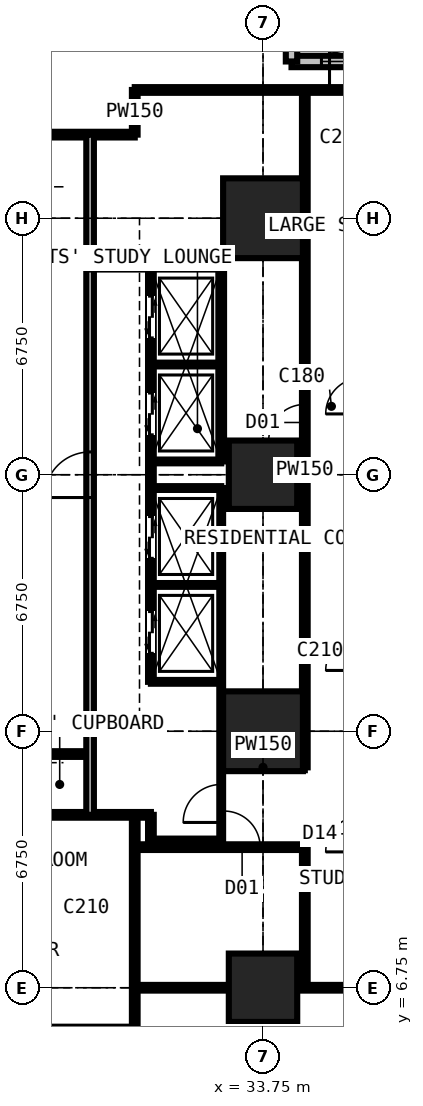
"""IFC4 building model, lengths in metres.
Left out: names, types, materials, properties, quantities, classifications, styles, units other than length and angle.
Written with IfcOpenShell. Run it as: python <this file> out.ifc"""

import sys

from ifc_helpers import new_model, si_unit, direction, frame, frame_2d, origin, origin_2d, place, context, subcontext, project, spatial, rectangle, extrude, element, fill, save


model = new_model("IFC4")
c1 = context("Model", 3, precision=1e-05, world=origin(), true_north=direction((0.0, 1.0)))
c2 = subcontext(c1, "Body", "Model", "MODEL_VIEW")
j1 = project(units=[si_unit("LENGTHUNIT", "METRE"), si_unit("PLANEANGLEUNIT", "RADIAN")], contexts=[c1])
p1 = place(None, origin())
s1 = spatial("IfcSite", under=j1, at=p1, CompositionType="ELEMENT")
p2 = place(p1, origin())
s2 = spatial("IfcBuilding", under=s1, at=p2, CompositionType="ELEMENT")
p3 = place(p2, frame((0.0, 0.0, 83.7)))
s3 = spatial("IfcBuildingStorey", under=s2, at=p3, CompositionType="ELEMENT", Elevation=83.7)
p4 = place(p3, frame((33.75, 6.75, 0.0), z_axis=(0.0, 0.0, 1.0), x_axis=(1.0, 0.0, 0.0)))
e1 = element("IfcColumn", 1, at=p4, inside=s3, PredefinedType="COLUMN", context=c2, shape_type="SweptSolid", body=[
    extrude(rectangle(XDim=1.8, YDim=1.8, at=origin_2d()), origin(), (0.0, 0.0, 1.0), 3.6),
])
p5 = place(p3, frame((33.75, 13.5, 0.0), z_axis=(0.0, 0.0, 1.0), x_axis=(1.0, 0.0, 0.0)))
e2 = element("IfcColumn", 2, at=p5, inside=s3, PredefinedType="COLUMN", context=c2, shape_type="SweptSolid", body=[
    extrude(rectangle(XDim=2.1, YDim=2.1, at=origin_2d()), origin(), (0.0, 0.0, 1.0), 3.6),
])
p6 = place(p3, frame((33.75, 20.25, 0.0), z_axis=(0.0, 0.0, 1.0), x_axis=(1.0, 0.0, 0.0)))
e3 = element("IfcColumn", 3, at=p6, inside=s3, PredefinedType="COLUMN", context=c2, shape_type="SweptSolid", body=[
    extrude(rectangle(XDim=1.8, YDim=1.8, at=origin_2d()), origin(), (0.0, 0.0, 1.0), 3.6),
])
p7 = place(p3, frame((33.75, 27.0, 0.0), z_axis=(0.0, 0.0, 1.0), x_axis=(1.0, 0.0, 0.0)))
e4 = element("IfcColumn", 4, at=p7, inside=s3, PredefinedType="COLUMN", context=c2, shape_type="SweptSolid", body=[
    extrude(rectangle(XDim=2.1, YDim=2.1, at=origin_2d()), origin(), (0.0, 0.0, 1.0), 3.6),
])
p8 = place(p3, frame((37.875, 31.125, 0.0), z_axis=(0.0, 0.0, 1.0), x_axis=(-1.0, 0.0, 0.0)))
e5 = element("IfcWall", 5, at=p8, inside=s3, PredefinedType="SOLIDWALL", context=c2, shape_type="SweptSolid", body=[
    extrude(rectangle(XDim=3.375, YDim=0.3, at=frame_2d((1.688, 0.0))), origin(), (0.0, 0.0, 1.0), 3.375),
])
p9 = place(p8, frame((0.788, 0.0, 0.6)))
e6 = element("IfcOpeningElement", 6, at=p9, cuts=e5, PredefinedType="OPENING", context=c2, shape_type="SweptSolid", body=[
    extrude(rectangle(XDim=1.8, YDim=2.1, at=frame_2d((0.9, 1.05))), frame((0.0, 0.16, 0.0), z_axis=(0.0, -1.0, 0.0), x_axis=(1.0, 0.0, 0.0)), (0.0, 0.0, 1.0), 0.32),
])
p10 = place(p3, frame((34.5, 31.125, 0.0), z_axis=(0.0, 0.0, 1.0), x_axis=(0.0, 1.0, 0.0)))
e7 = element("IfcWall", 7, at=p10, inside=s3, PredefinedType="SOLIDWALL", context=c2, shape_type="SweptSolid", body=[
    extrude(rectangle(XDim=3.375, YDim=0.3, at=frame_2d((1.688, 0.0))), origin(), (0.0, 0.0, 1.0), 3.375),
])
p11 = place(p10, frame((0.343, 0.0, 0.9)))
e8 = element("IfcOpeningElement", 8, at=p11, cuts=e7, PredefinedType="OPENING", context=c2, shape_type="SweptSolid", body=[
    extrude(rectangle(XDim=1.2, YDim=1.8, at=frame_2d((0.6, 0.9))), frame((0.0, 0.16, 0.0), z_axis=(0.0, -1.0, 0.0), x_axis=(1.0, 0.0, 0.0)), (0.0, 0.0, 1.0), 0.32),
])
p12 = place(p3, frame((10.125, 11.3, 0.0), z_axis=(0.0, 0.0, 1.0), x_axis=(1.0, 0.0, 0.0)))
e9 = element("IfcWall", 9, at=p12, inside=s3, PredefinedType="PARTITIONING", context=c2, shape_type="SweptSolid", body=[
    extrude(rectangle(XDim=20.675, YDim=0.15, at=frame_2d((10.337, 0.0))), origin(), (0.0, 0.0, 1.0), 3.375),
])
p13 = place(p12, frame((8.375, 0.0, 0.0)))
e10 = element("IfcOpeningElement", 10, at=p13, cuts=e9, PredefinedType="OPENING", context=c2, shape_type="SweptSolid", body=[
    extrude(rectangle(XDim=1.0, YDim=2.2, at=frame_2d((0.5, 1.1))), frame((0.0, 0.085, 0.0), z_axis=(0.0, -1.0, 0.0), x_axis=(1.0, 0.0, 0.0)), (0.0, 0.0, 1.0), 0.17),
])
p14 = place(p12, frame((10.975, 0.0, 0.0)))
e11 = element("IfcOpeningElement", 11, at=p14, cuts=e9, PredefinedType="OPENING", context=c2, shape_type="SweptSolid", body=[
    extrude(rectangle(XDim=1.0, YDim=2.2, at=frame_2d((0.5, 1.1))), frame((0.0, 0.085, 0.0), z_axis=(0.0, -1.0, 0.0), x_axis=(1.0, 0.0, 0.0)), (0.0, 0.0, 1.0), 0.17),
])
p15 = place(p12, frame((3.925, 0.0, 0.0)))
e12 = element("IfcOpeningElement", 12, at=p15, cuts=e9, PredefinedType="OPENING", context=c2, shape_type="SweptSolid", body=[
    extrude(rectangle(XDim=0.95, YDim=2.2, at=frame_2d((0.475, 1.1))), frame((0.0, 0.085, 0.0), z_axis=(0.0, -1.0, 0.0), x_axis=(1.0, 0.0, 0.0)), (0.0, 0.0, 1.0), 0.17),
])
p16 = place(p3, frame((11.3, 29.2, 0.0), z_axis=(0.0, 0.0, 1.0), x_axis=(1.0, 0.0, 0.0)))
e13 = element("IfcWall", 13, at=p16, inside=s3, PredefinedType="PARTITIONING", context=c2, shape_type="SweptSolid", body=[
    extrude(rectangle(XDim=19.075, YDim=0.15, at=frame_2d((9.538, 0.0))), origin(), (0.0, 0.0, 1.0), 3.375),
])
p17 = place(p16, frame((5.825, 0.0, 0.0)))
e14 = element("IfcOpeningElement", 14, at=p17, cuts=e13, PredefinedType="OPENING", context=c2, shape_type="SweptSolid", body=[
    extrude(rectangle(XDim=0.95, YDim=2.2, at=frame_2d((0.475, 1.1))), frame((0.0, 0.085, 0.0), z_axis=(0.0, -1.0, 0.0), x_axis=(1.0, 0.0, 0.0)), (0.0, 0.0, 1.0), 0.17),
])
p18 = place(p16, frame((9.2, 0.0, 0.0)))
e15 = element("IfcOpeningElement", 15, at=p18, cuts=e13, PredefinedType="OPENING", context=c2, shape_type="SweptSolid", body=[
    extrude(rectangle(XDim=0.95, YDim=2.2, at=frame_2d((0.475, 1.1))), frame((0.0, 0.085, 0.0), z_axis=(0.0, -1.0, 0.0), x_axis=(1.0, 0.0, 0.0)), (0.0, 0.0, 1.0), 0.17),
])
p19 = place(p16, frame((0.6, 0.0, 0.0)))
e16 = element("IfcOpeningElement", 16, at=p19, cuts=e13, PredefinedType="OPENING", context=c2, shape_type="SweptSolid", body=[
    extrude(rectangle(XDim=1.0, YDim=2.2, at=frame_2d((0.5, 1.1))), frame((0.0, 0.085, 0.0), z_axis=(0.0, -1.0, 0.0), x_axis=(1.0, 0.0, 0.0)), (0.0, 0.0, 1.0), 0.17),
])
p20 = place(p3, frame((27.6, 12.9, 0.0), z_axis=(0.0, 0.0, 1.0), x_axis=(1.0, 0.0, 0.0)))
e17 = element("IfcWall", 17, at=p20, inside=s3, PredefinedType="PARTITIONING", context=c2, shape_type="SweptSolid", body=[
    extrude(rectangle(XDim=1.6, YDim=0.15, at=frame_2d((0.8, 0.0))), origin(), (0.0, 0.0, 1.0), 2.806),
])
p21 = place(p3, frame((29.2, 11.3, 0.0), z_axis=(0.0, 0.0, 1.0), x_axis=(0.0, 1.0, 0.0)))
e18 = element("IfcWall", 18, at=p21, inside=s3, PredefinedType="PARTITIONING", context=c2, shape_type="SweptSolid", body=[
    extrude(rectangle(XDim=17.9, YDim=0.2, at=frame_2d((8.95, 0.0))), origin(), (0.0, 0.0, 1.0), 3.375),
])
p22 = place(p21, frame((8.35, 0.0, 0.0)))
e19 = element("IfcOpeningElement", 19, at=p22, cuts=e18, PredefinedType="OPENING", context=c2, shape_type="SweptSolid", body=[
    extrude(rectangle(XDim=1.2, YDim=2.2, at=frame_2d((0.6, 1.1))), frame((0.0, 0.11, 0.0), z_axis=(0.0, -1.0, 0.0), x_axis=(1.0, 0.0, 0.0)), (0.0, 0.0, 1.0), 0.22),
])
p23 = place(p3, frame((29.2, 25.7, 0.0), z_axis=(0.0, 0.0, 1.0), x_axis=(1.0, 0.0, 0.0)))
e20 = element("IfcWall", 20, at=p23, inside=s3, PredefinedType="SHEAR", context=c2, shape_type="SweptSolid", body=[
    extrude(rectangle(XDim=3.45, YDim=0.1, at=frame_2d((1.725, 0.0))), origin(), (0.0, 0.0, 1.0), 3.375),
])
p24 = place(p3, frame((30.375, -0.734, 0.0), z_axis=(0.0, 0.0, 1.0), x_axis=(0.0, 1.0, 0.0)))
e21 = element("IfcWall", 21, at=p24, inside=s3, PredefinedType="PARTITIONING", context=c2, shape_type="SweptSolid", body=[
    extrude(rectangle(XDim=12.034, YDim=0.15, at=frame_2d((6.017, 0.0))), origin(), (0.0, 0.0, 1.0), 3.375),
])
p25 = place(p24, frame((5.134, 0.0, 0.0)))
e22 = element("IfcOpeningElement", 22, at=p25, cuts=e21, PredefinedType="OPENING", context=c2, shape_type="SweptSolid", body=[
    extrude(rectangle(XDim=1.0, YDim=2.2, at=frame_2d((0.5, 1.1))), frame((0.0, 0.085, 0.0), z_axis=(0.0, -1.0, 0.0), x_axis=(1.0, 0.0, 0.0)), (0.0, 0.0, 1.0), 0.17),
])
p26 = place(p3, frame((30.375, 6.75, 0.0), z_axis=(0.0, 0.0, 1.0), x_axis=(1.0, 0.0, 0.0)))
e23 = element("IfcWall", 23, at=p26, inside=s3, PredefinedType="PARTITIONING", context=c2, shape_type="SweptSolid", body=[
    extrude(rectangle(XDim=5.975, YDim=0.15, at=frame_2d((2.988, 0.0))), origin(), (0.0, 0.0, 1.0), 2.877),
])
p27 = place(p3, frame((30.375, 10.45, 0.0), z_axis=(0.0, 0.0, 1.0), x_axis=(1.0, 0.0, 0.0)))
e24 = element("IfcWall", 24, at=p27, inside=s3, PredefinedType="PARTITIONING", context=c2, shape_type="SweptSolid", body=[
    extrude(rectangle(XDim=4.475, YDim=0.15, at=frame_2d((2.238, 0.0))), origin(), (0.0, 0.0, 1.0), 3.375),
])
p28 = place(p27, frame((2.35, 0.0, 0.0)))
e25 = element("IfcOpeningElement", 25, at=p28, cuts=e24, PredefinedType="OPENING", context=c2, shape_type="SweptSolid", body=[
    extrude(rectangle(XDim=0.95, YDim=2.2, at=frame_2d((0.475, 1.1))), frame((0.0, 0.085, 0.0), z_axis=(0.0, -1.0, 0.0), x_axis=(1.0, 0.0, 0.0)), (0.0, 0.0, 1.0), 0.17),
])
p29 = place(p3, frame((30.375, 29.2, 0.0), z_axis=(0.0, 0.0, 1.0), x_axis=(0.0, 1.0, 0.0)))
e26 = element("IfcWall", 26, at=p29, inside=s3, PredefinedType="PARTITIONING", context=c2, shape_type="SweptSolid", body=[
    extrude(rectangle(XDim=1.175, YDim=0.15, at=frame_2d((0.587, 0.0))), origin(), (0.0, 0.0, 1.0), 3.375),
])
p30 = place(p3, frame((30.375, 30.375, 0.0), z_axis=(0.0, 0.0, 1.0), x_axis=(1.0, 0.0, 0.0)))
e27 = element("IfcWall", 27, at=p30, inside=s3, PredefinedType="PARTITIONING", context=c2, shape_type="SweptSolid", body=[
    extrude(rectangle(XDim=7.35, YDim=0.15, at=frame_2d((3.675, 0.0))), origin(), (0.0, 0.0, 1.0), 2.877),
])
p31 = place(p30, frame((5.125, 0.0, 0.0)))
e28 = element("IfcOpeningElement", 28, at=p31, cuts=e27, PredefinedType="OPENING", context=c2, shape_type="SweptSolid", body=[
    extrude(rectangle(XDim=1.0, YDim=2.2, at=frame_2d((0.5, 1.1))), frame((0.0, 0.085, 0.0), z_axis=(0.0, -1.0, 0.0), x_axis=(1.0, 0.0, 0.0)), (0.0, 0.0, 1.0), 0.17),
])
p32 = place(p3, frame((30.8, 10.6, 0.0), z_axis=(0.0, 0.0, 1.0), x_axis=(0.0, 1.0, 0.0)))
e29 = element("IfcWall", 29, at=p32, inside=s3, PredefinedType="PARTITIONING", context=c2, shape_type="SweptSolid", body=[
    extrude(rectangle(XDim=0.7, YDim=0.15, at=frame_2d((0.35, 0.0))), origin(), (0.0, 0.0, 1.0), 3.375),
])
p33 = place(p3, frame((30.8, 10.6, 0.0), z_axis=(0.0, 0.0, 1.0), x_axis=(1.0, 0.0, 0.0)))
e30 = element("IfcWall", 30, at=p33, inside=s3, PredefinedType="PARTITIONING", context=c2, shape_type="SweptSolid", body=[
    extrude(rectangle(XDim=1.85, YDim=0.15, at=frame_2d((0.925, 0.0))), origin(), (0.0, 0.0, 1.0), 3.375),
])
p34 = place(p3, frame((30.8, 14.8, 0.0), z_axis=(0.0, 0.0, 1.0), x_axis=(0.0, 1.0, 0.0)))
e31 = element("IfcWall", 31, at=p34, inside=s3, PredefinedType="PARTITIONING", context=c2, shape_type="SweptSolid", body=[
    extrude(rectangle(XDim=10.9, YDim=0.15, at=frame_2d((5.45, 0.0))), origin(), (0.0, 0.0, 1.0), 3.375),
])
p35 = place(p34, frame((0.75, 0.0, 0.0)))
e32 = element("IfcOpeningElement", 32, at=p35, cuts=e31, PredefinedType="OPENING", context=c2, shape_type="SweptSolid", body=[
    extrude(rectangle(XDim=1.1, YDim=2.2, at=frame_2d((0.55, 1.1))), frame((0.0, 0.085, 0.0), z_axis=(0.0, -1.0, 0.0), x_axis=(1.0, 0.0, 0.0)), (0.0, 0.0, 1.0), 0.17),
])
p36 = place(p34, frame((3.25, 0.0, 0.0)))
e33 = element("IfcOpeningElement", 33, at=p36, cuts=e31, PredefinedType="OPENING", context=c2, shape_type="SweptSolid", body=[
    extrude(rectangle(XDim=1.1, YDim=2.2, at=frame_2d((0.55, 1.1))), frame((0.0, 0.085, 0.0), z_axis=(0.0, -1.0, 0.0), x_axis=(1.0, 0.0, 0.0)), (0.0, 0.0, 1.0), 0.17),
])
p37 = place(p34, frame((6.5, 0.0, 0.0)))
e34 = element("IfcOpeningElement", 34, at=p37, cuts=e31, PredefinedType="OPENING", context=c2, shape_type="SweptSolid", body=[
    extrude(rectangle(XDim=1.1, YDim=2.2, at=frame_2d((0.55, 1.1))), frame((0.0, 0.085, 0.0), z_axis=(0.0, -1.0, 0.0), x_axis=(1.0, 0.0, 0.0)), (0.0, 0.0, 1.0), 0.17),
])
p38 = place(p34, frame((9.05, 0.0, 0.0)))
e35 = element("IfcOpeningElement", 35, at=p38, cuts=e31, PredefinedType="OPENING", context=c2, shape_type="SweptSolid", body=[
    extrude(rectangle(XDim=1.1, YDim=2.2, at=frame_2d((0.55, 1.1))), frame((0.0, 0.085, 0.0), z_axis=(0.0, -1.0, 0.0), x_axis=(1.0, 0.0, 0.0)), (0.0, 0.0, 1.0), 0.17),
])
for number, where, z_axis, x_axis in (
    (36, (30.8, 14.8, 0.0), (0.0, 0.0, 1.0), (1.0, 0.0, 0.0)),
    (37, (30.8, 17.35, 0.0), (0.0, 0.0, 1.0), (1.0, 0.0, 0.0)),
    (38, (30.8, 19.9, 0.0), (0.0, 0.0, 1.0), (1.0, 0.0, 0.0)),
    (39, (30.8, 20.6, 0.0), (0.0, 0.0, 1.0), (1.0, 0.0, 0.0)),
    (40, (30.8, 23.15, 0.0), (0.0, 0.0, 1.0), (1.0, 0.0, 0.0)),
):
    element("IfcWall", number, at=place(p3, frame(where, z_axis=z_axis, x_axis=x_axis)), inside=s3, PredefinedType="SHEAR", context=c2, shape_type="SweptSolid", body=[
        extrude(rectangle(XDim=1.85, YDim=0.1, at=frame_2d((0.925, 0.0))), origin(), (0.0, 0.0, 1.0), 3.375),
    ])
p39 = place(p3, frame((32.65, 10.6, 0.0), z_axis=(0.0, 0.0, 1.0), x_axis=(0.0, 1.0, 0.0)))
e41 = element("IfcWall", 41, at=p39, inside=s3, PredefinedType="SHEAR", context=c2, shape_type="SweptSolid", body=[
    extrude(rectangle(XDim=9.3, YDim=0.1, at=frame_2d((4.65, 0.0))), origin(), (0.0, 0.0, 1.0), 3.375),
])
p40 = place(p39, frame((0.5, 0.0, 0.0)))
e42 = element("IfcOpeningElement", 42, at=p40, cuts=e41, PredefinedType="OPENING", context=c2, shape_type="SweptSolid", body=[
    extrude(rectangle(XDim=1.0, YDim=2.2, at=frame_2d((0.5, 1.1))), frame((0.0, 0.06, 0.0), z_axis=(0.0, -1.0, 0.0), x_axis=(1.0, 0.0, 0.0)), (0.0, 0.0, 1.0), 0.12),
])
p41 = place(p3, frame((32.65, 12.55, 0.0), z_axis=(0.0, 0.0, 1.0), x_axis=(1.0, 0.0, 0.0)))
e43 = element("IfcWall", 43, at=p41, inside=s3, PredefinedType="PARTITIONING", context=c2, shape_type="SweptSolid", body=[
    extrude(rectangle(XDim=2.2, YDim=0.15, at=frame_2d((1.1, 0.0))), origin(), (0.0, 0.0, 1.0), 3.375),
])
p42 = place(p3, frame((32.65, 20.6, 0.0), z_axis=(0.0, 0.0, 1.0), x_axis=(0.0, 1.0, 0.0)))
e44 = element("IfcWall", 44, at=p42, inside=s3, PredefinedType="PARTITIONING", context=c2, shape_type="SweptSolid", body=[
    extrude(rectangle(XDim=5.1, YDim=0.15, at=frame_2d((2.55, 0.0))), origin(), (0.0, 0.0, 1.0), 3.375),
])
p43 = place(p3, frame((34.85, 6.75, 0.0), z_axis=(0.0, 0.0, 1.0), x_axis=(0.0, 1.0, 0.0)))
e45 = element("IfcWall", 45, at=p43, inside=s3, PredefinedType="PARTITIONING", context=c2, shape_type="SweptSolid", body=[
    extrude(rectangle(XDim=3.7, YDim=0.15, at=frame_2d((1.85, 0.0))), origin(), (0.0, 0.0, 1.0), 3.375),
])
p44 = place(p3, frame((34.85, 12.55, 0.0), z_axis=(0.0, 0.0, 1.0), x_axis=(0.0, 1.0, 0.0)))
e46 = element("IfcWall", 46, at=p44, inside=s3, PredefinedType="PARTITIONING", context=c2, shape_type="SweptSolid", body=[
    extrude(rectangle(XDim=17.825, YDim=0.15, at=frame_2d((8.913, 0.0))), origin(), (0.0, 0.0, 1.0), 3.375),
])
p45 = place(p44, frame((8.6, 0.0, 0.0)))
e47 = element("IfcOpeningElement", 47, at=p45, cuts=e46, PredefinedType="OPENING", context=c2, shape_type="SweptSolid", body=[
    extrude(rectangle(XDim=0.95, YDim=2.2, at=frame_2d((0.475, 1.1))), frame((0.0, 0.085, 0.0), z_axis=(0.0, -1.0, 0.0), x_axis=(1.0, 0.0, 0.0)), (0.0, 0.0, 1.0), 0.17),
])
p46 = place(p9, origin())
e48 = element("IfcWindow", 48, at=p46, inside=s3, PartitioningType="SINGLE_PANEL", PredefinedType="WINDOW", context=c2, shape_type="SweptSolid", body=[
    extrude(rectangle(XDim=1.8, YDim=2.1, at=frame_2d((0.9, 1.05))), frame((0.0, 0.03, 0.0), z_axis=(0.0, -1.0, 0.0), x_axis=(1.0, 0.0, 0.0)), (0.0, 0.0, 1.0), 0.06),
])
fill(e6, e48)
p47 = place(p40, origin())
e49 = element("IfcDoor", 49, at=p47, inside=s3, OperationType="SINGLE_SWING_LEFT", PredefinedType="DOOR", context=c2, shape_type="SweptSolid", body=[
    extrude(rectangle(XDim=1.0, YDim=2.2, at=frame_2d((0.5, 1.1))), frame((0.0, 0.025, 0.0), z_axis=(0.0, -1.0, 0.0), x_axis=(1.0, 0.0, 0.0)), (0.0, 0.0, 1.0), 0.05),
])
fill(e42, e49)
p48 = place(p45, origin())
e50 = element("IfcDoor", 50, at=p48, inside=s3, OperationType="SINGLE_SWING_LEFT", PredefinedType="DOOR", context=c2, shape_type="SweptSolid", body=[
    extrude(rectangle(XDim=0.95, YDim=2.2, at=frame_2d((0.475, 1.1))), frame((0.0, 0.025, 0.0), z_axis=(0.0, -1.0, 0.0), x_axis=(1.0, 0.0, 0.0)), (0.0, 0.0, 1.0), 0.05),
])
fill(e47, e50)
p49 = place(p28, origin())
e51 = element("IfcDoor", 51, at=p49, inside=s3, OperationType="SINGLE_SWING_LEFT", PredefinedType="DOOR", context=c2, shape_type="SweptSolid", body=[
    extrude(rectangle(XDim=0.95, YDim=2.2, at=frame_2d((0.475, 1.1))), frame((0.0, 0.025, 0.0), z_axis=(0.0, -1.0, 0.0), x_axis=(1.0, 0.0, 0.0)), (0.0, 0.0, 1.0), 0.05),
])
fill(e25, e51)
p50 = place(p31, origin())
e52 = element("IfcDoor", 52, at=p50, inside=s3, OperationType="SINGLE_SWING_LEFT", PredefinedType="DOOR", context=c2, shape_type="SweptSolid", body=[
    extrude(rectangle(XDim=1.0, YDim=2.2, at=frame_2d((0.5, 1.1))), frame((0.0, 0.025, 0.0), z_axis=(0.0, -1.0, 0.0), x_axis=(1.0, 0.0, 0.0)), (0.0, 0.0, 1.0), 0.05),
])
fill(e28, e52)
p51 = place(p35, origin())
e53 = element("IfcDoor", 53, at=p51, inside=s3, OperationType="DOUBLE_DOOR_SLIDING", PredefinedType="DOOR", context=c2, shape_type="SweptSolid", body=[
    extrude(rectangle(XDim=1.1, YDim=2.2, at=frame_2d((0.55, 1.1))), frame((0.0, 0.025, 0.0), z_axis=(0.0, -1.0, 0.0), x_axis=(1.0, 0.0, 0.0)), (0.0, 0.0, 1.0), 0.05),
])
fill(e32, e53)
p52 = place(p36, origin())
e54 = element("IfcDoor", 54, at=p52, inside=s3, OperationType="DOUBLE_DOOR_SLIDING", PredefinedType="DOOR", context=c2, shape_type="SweptSolid", body=[
    extrude(rectangle(XDim=1.1, YDim=2.2, at=frame_2d((0.55, 1.1))), frame((0.0, 0.025, 0.0), z_axis=(0.0, -1.0, 0.0), x_axis=(1.0, 0.0, 0.0)), (0.0, 0.0, 1.0), 0.05),
])
fill(e33, e54)
p53 = place(p37, origin())
e55 = element("IfcDoor", 55, at=p53, inside=s3, OperationType="DOUBLE_DOOR_SLIDING", PredefinedType="DOOR", context=c2, shape_type="SweptSolid", body=[
    extrude(rectangle(XDim=1.1, YDim=2.2, at=frame_2d((0.55, 1.1))), frame((0.0, 0.025, 0.0), z_axis=(0.0, -1.0, 0.0), x_axis=(1.0, 0.0, 0.0)), (0.0, 0.0, 1.0), 0.05),
])
fill(e34, e55)
p54 = place(p38, origin())
e56 = element("IfcDoor", 56, at=p54, inside=s3, OperationType="DOUBLE_DOOR_SLIDING", PredefinedType="DOOR", context=c2, shape_type="SweptSolid", body=[
    extrude(rectangle(XDim=1.1, YDim=2.2, at=frame_2d((0.55, 1.1))), frame((0.0, 0.025, 0.0), z_axis=(0.0, -1.0, 0.0), x_axis=(1.0, 0.0, 0.0)), (0.0, 0.0, 1.0), 0.05),
])
fill(e35, e56)
p55 = place(p22, origin())
e57 = element("IfcDoor", 57, at=p55, inside=s3, OperationType="DOUBLE_DOOR_SINGLE_SWING", PredefinedType="DOOR", context=c2, shape_type="SweptSolid", body=[
    extrude(rectangle(XDim=1.2, YDim=2.2, at=frame_2d((0.6, 1.1))), frame((0.0, 0.025, 0.0), z_axis=(0.0, -1.0, 0.0), x_axis=(1.0, 0.0, 0.0)), (0.0, 0.0, 1.0), 0.05),
])
fill(e19, e57)
save(model, sys.argv[1])
